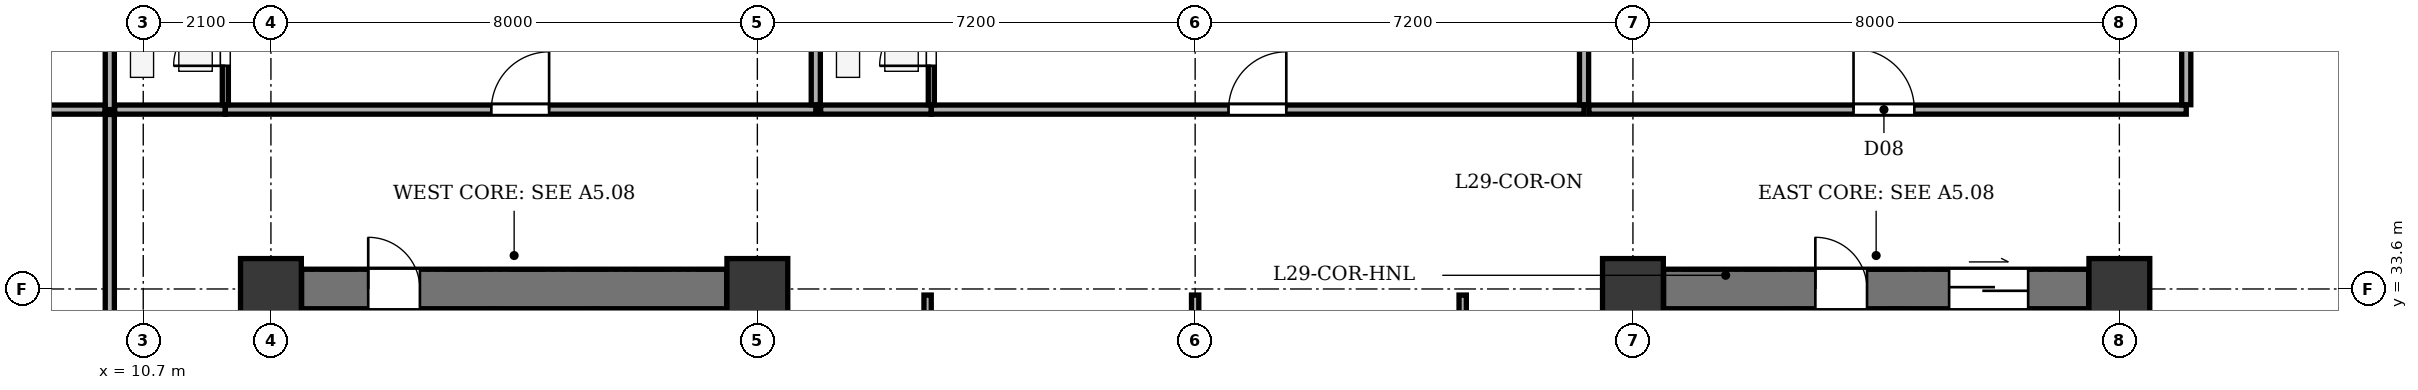
"""IFC4 building model, lengths in metres.
Left out: names, types, materials, properties, quantities, classifications, styles, units other than length and angle.
Written with IfcOpenShell. Run it as: python <this file> out.ifc"""

import sys

from ifc_helpers import new_model, si_unit, direction, frame, frame_2d, origin, origin_2d, place, context, subcontext, project, spatial, rectangle, extrude, element, fill, save


model = new_model("IFC4")
c1 = context("Model", 3, precision=1e-05, world=origin(), true_north=direction((0.0, 1.0)))
c2 = subcontext(c1, "Body", "Model", "MODEL_VIEW")
j1 = project(units=[si_unit("LENGTHUNIT", "METRE"), si_unit("PLANEANGLEUNIT", "RADIAN")], contexts=[c1])
p1 = place(None, origin())
s1 = spatial("IfcSite", under=j1, at=p1, CompositionType="ELEMENT")
p2 = place(p1, origin())
s2 = spatial("IfcBuilding", under=s1, at=p2, CompositionType="ELEMENT")
p3 = place(p2, frame((0.0, 0.0, 120.3)))
s3 = spatial("IfcBuildingStorey", under=s2, at=p3, CompositionType="ELEMENT", Elevation=120.3)
for number, where, z_axis, x_axis in (
    (1, (12.8, 33.6, 0.0), (0.0, 0.0, 1.0), (1.0, 0.0, 0.0)),
    (2, (20.8, 33.6, 0.0), (0.0, 0.0, 1.0), (1.0, 0.0, 0.0)),
    (3, (35.2, 33.6, 0.0), (0.0, 0.0, 1.0), (1.0, 0.0, 0.0)),
    (4, (43.2, 33.6, 0.0), (0.0, 0.0, 1.0), (1.0, 0.0, 0.0)),
):
    element("IfcColumn", number, at=place(p3, frame(where, z_axis=z_axis, x_axis=x_axis)), inside=s3, PredefinedType="COLUMN", context=c2, shape_type="SweptSolid", body=[
        extrude(rectangle(XDim=1.0, YDim=1.0, at=origin_2d()), origin(), (0.0, 0.0, 1.0), 3.5),
    ])
p4 = place(p3, frame((13.305, 33.6, 0.0), z_axis=(0.0, 0.0, 1.0), x_axis=(1.0, 0.0, 0.0)))
e5 = element("IfcWall", 5, at=p4, inside=s3, PredefinedType="SHEAR", context=c2, shape_type="SweptSolid", body=[
    extrude(rectangle(XDim=6.99, YDim=0.65, at=frame_2d((3.495, 0.0))), origin(), (0.0, 0.0, 1.0), 3.2),
])
p5 = place(p4, frame((1.095, 0.0, 0.0)))
e6 = element("IfcOpeningElement", 6, at=p5, cuts=e5, PredefinedType="OPENING", context=c2, shape_type="SweptSolid", body=[
    extrude(rectangle(XDim=0.85, YDim=2.02, at=frame_2d((0.425, 1.01))), frame((0.0, 0.335, 0.0), z_axis=(0.0, -1.0, 0.0), x_axis=(1.0, 0.0, 0.0)), (0.0, 0.0, 1.0), 0.67),
])
p6 = place(p3, frame((16.435, 21.135, 0.0), z_axis=(0.0, 0.0, 1.0), x_axis=(0.0, 1.0, 0.0)))
e7 = element("IfcWall", 7, at=p6, inside=s3, PredefinedType="SHEAR", context=c2, shape_type="SweptSolid", body=[
    extrude(rectangle(XDim=12.13, YDim=0.25, at=frame_2d((6.065, 0.0))), origin(), (0.0, 0.0, 1.0), 3.2),
])
p7 = place(p6, frame((0.515, 0.0, 0.0)))
e8 = element("IfcOpeningElement", 8, at=p7, cuts=e7, PredefinedType="OPENING", context=c2, shape_type="SweptSolid", body=[
    extrude(rectangle(XDim=1.2, YDim=2.15, at=frame_2d((0.6, 1.075))), frame((0.0, 0.135, 0.0), z_axis=(0.0, -1.0, 0.0), x_axis=(1.0, 0.0, 0.0)), (0.0, 0.0, 1.0), 0.27),
])
p8 = place(p6, frame((2.665, 0.0, 0.0)))
e9 = element("IfcOpeningElement", 9, at=p8, cuts=e7, PredefinedType="OPENING", context=c2, shape_type="SweptSolid", body=[
    extrude(rectangle(XDim=1.15, YDim=2.15, at=frame_2d((0.575, 1.075))), frame((0.0, 0.135, 0.0), z_axis=(0.0, -1.0, 0.0), x_axis=(1.0, 0.0, 0.0)), (0.0, 0.0, 1.0), 0.27),
])
p9 = place(p3, frame((18.12, 31.17, 0.0), z_axis=(0.0, 0.0, 1.0), x_axis=(0.0, 1.0, 0.0)))
e10 = element("IfcWall", 10, at=p9, inside=s3, PredefinedType="PARTITIONING", context=c2, shape_type="SweptSolid", body=[
    extrude(rectangle(XDim=2.095, YDim=0.18, at=frame_2d((1.047, 0.0))), origin(), (0.0, 0.0, 1.0), 3.2),
])
p10 = place(p3, frame((35.705, 33.6, 0.0), z_axis=(0.0, 0.0, 1.0), x_axis=(1.0, 0.0, 0.0)))
e11 = element("IfcWall", 11, at=p10, inside=s3, PredefinedType="SHEAR", context=c2, shape_type="SweptSolid", body=[
    extrude(rectangle(XDim=6.99, YDim=0.65, at=frame_2d((3.495, 0.0))), origin(), (0.0, 0.0, 1.0), 3.2),
])
p11 = place(p10, frame((4.695, 0.0, 0.0)))
e12 = element("IfcOpeningElement", 12, at=p11, cuts=e11, PredefinedType="OPENING", context=c2, shape_type="SweptSolid", body=[
    extrude(rectangle(XDim=1.3, YDim=2.15, at=frame_2d((0.65, 1.075))), frame((0.0, 0.335, 0.0), z_axis=(0.0, -1.0, 0.0), x_axis=(1.0, 0.0, 0.0)), (0.0, 0.0, 1.0), 0.67),
])
p12 = place(p10, frame((2.495, 0.0, 0.0)))
e13 = element("IfcOpeningElement", 13, at=p12, cuts=e11, PredefinedType="OPENING", context=c2, shape_type="SweptSolid", body=[
    extrude(rectangle(XDim=0.85, YDim=2.02, at=frame_2d((0.425, 1.01))), frame((0.0, 0.335, 0.0), z_axis=(0.0, -1.0, 0.0), x_axis=(1.0, 0.0, 0.0)), (0.0, 0.0, 1.0), 0.67),
])
p13 = place(p3, frame((39.565, 21.135, 0.0), z_axis=(0.0, 0.0, 1.0), x_axis=(0.0, 1.0, 0.0)))
e14 = element("IfcWall", 14, at=p13, inside=s3, PredefinedType="SHEAR", context=c2, shape_type="SweptSolid", body=[
    extrude(rectangle(XDim=12.13, YDim=0.25, at=frame_2d((6.065, 0.0))), origin(), (0.0, 0.0, 1.0), 3.2),
])
p14 = place(p13, frame((0.515, 0.0, 0.0)))
e15 = element("IfcOpeningElement", 15, at=p14, cuts=e14, PredefinedType="OPENING", context=c2, shape_type="SweptSolid", body=[
    extrude(rectangle(XDim=1.2, YDim=2.15, at=frame_2d((0.6, 1.075))), frame((0.0, 0.135, 0.0), z_axis=(0.0, -1.0, 0.0), x_axis=(1.0, 0.0, 0.0)), (0.0, 0.0, 1.0), 0.27),
])
p15 = place(p13, frame((2.665, 0.0, 0.0)))
e16 = element("IfcOpeningElement", 16, at=p15, cuts=e14, PredefinedType="OPENING", context=c2, shape_type="SweptSolid", body=[
    extrude(rectangle(XDim=1.15, YDim=2.15, at=frame_2d((0.575, 1.075))), frame((0.0, 0.135, 0.0), z_axis=(0.0, -1.0, 0.0), x_axis=(1.0, 0.0, 0.0)), (0.0, 0.0, 1.0), 0.27),
])
p16 = place(p3, frame((37.9, 25.27, 0.0), z_axis=(0.0, 0.0, 1.0), x_axis=(0.0, 1.0, 0.0)))
e17 = element("IfcWall", 17, at=p16, inside=s3, PredefinedType="SOLIDWALL", context=c2, shape_type="SweptSolid", body=[
    extrude(rectangle(XDim=7.995, YDim=0.2, at=frame_2d((3.998, 0.0))), origin(), (0.0, 0.0, 1.0), 3.2),
])
for number, where, z_axis, x_axis in (
    (18, (23.6, 25.315, 0.0), (0.0, 0.0, 1.0), (0.0, 1.0, 0.0)),
    (19, (32.4, 25.315, 0.0), (0.0, 0.0, 1.0), (0.0, 1.0, 0.0)),
):
    element("IfcWall", number, at=place(p3, frame(where, z_axis=z_axis, x_axis=x_axis)), inside=s3, PredefinedType="PARTITIONING", context=c2, shape_type="SweptSolid", body=[
        extrude(rectangle(XDim=8.185, YDim=0.12, at=frame_2d((4.093, 0.0))), origin(), (0.0, 0.0, 1.0), 3.2),
    ])
p17 = place(p3, frame((28.0, 25.315, 0.0), z_axis=(0.0, 0.0, 1.0), x_axis=(0.0, 1.0, 0.0)))
e20 = element("IfcWall", 20, at=p17, inside=s3, PredefinedType="PARTITIONING", context=c2, shape_type="SweptSolid", body=[
    extrude(rectangle(XDim=8.185, YDim=0.12, at=frame_2d((4.093, 0.0))), origin(), (0.0, 0.0, 1.0), 2.535),
])
p18 = place(p3, frame((10.15, 36.55, 0.0), z_axis=(0.0, 0.0, 1.0), x_axis=(0.0, 1.0, 0.0)))
e21 = element("IfcWall", 21, at=p18, inside=s3, PredefinedType="PARTITIONING", context=c2, shape_type="SweptSolid", body=[
    extrude(rectangle(XDim=9.575, YDim=0.15, at=frame_2d((4.788, 0.0))), origin(), (0.0, 0.0, 1.0), 3.2),
])
p19 = place(p3, frame((10.23, 36.55, 0.0), z_axis=(0.0, 0.0, 1.0), x_axis=(1.0, 0.0, 0.0)))
e22 = element("IfcWall", 22, at=p19, inside=s3, PredefinedType="PARTITIONING", context=c2, shape_type="SweptSolid", body=[
    extrude(rectangle(XDim=1.82, YDim=0.15, at=frame_2d((0.91, 0.0))), origin(), (0.0, 0.0, 1.0), 3.2),
])
p20 = place(p3, frame((12.05, 36.55, 0.0), z_axis=(0.0, 0.0, 1.0), x_axis=(1.0, 0.0, 0.0)))
e23 = element("IfcWall", 23, at=p20, inside=s3, PredefinedType="PARTITIONING", context=c2, shape_type="SweptSolid", body=[
    extrude(rectangle(XDim=9.711, YDim=0.15, at=frame_2d((4.855, 0.0))), origin(), (0.0, 0.0, 1.0), 3.2),
])
p21 = place(p20, frame((4.375, 0.0, 0.0)))
e24 = element("IfcOpeningElement", 24, at=p21, cuts=e23, PredefinedType="OPENING", context=c2, shape_type="SweptSolid", body=[
    extrude(rectangle(XDim=0.95, YDim=2.1, at=frame_2d((0.475, 1.05))), frame((0.0, 0.085, 0.0), z_axis=(0.0, -1.0, 0.0), x_axis=(1.0, 0.0, 0.0)), (0.0, 0.0, 1.0), 0.17),
])
p22 = place(p3, frame((12.05, 36.63, 0.0), z_axis=(0.0, 0.0, 1.0), x_axis=(0.0, 1.0, 0.0)))
e25 = element("IfcWall", 25, at=p22, inside=s3, PredefinedType="PARTITIONING", context=c2, shape_type="SweptSolid", body=[
    extrude(rectangle(XDim=2.25, YDim=0.1, at=frame_2d((1.125, 0.0))), origin(), (0.0, 0.0, 1.0), 3.2),
])
p23 = place(p22, frame((0.64, 0.0, 0.0)))
e26 = element("IfcOpeningElement", 26, at=p23, cuts=e25, PredefinedType="OPENING", context=c2, shape_type="SweptSolid", body=[
    extrude(rectangle(XDim=0.85, YDim=2.05, at=frame_2d((0.425, 1.025))), frame((0.0, 0.06, 0.0), z_axis=(0.0, -1.0, 0.0), x_axis=(1.0, 0.0, 0.0)), (0.0, 0.0, 1.0), 0.12),
])
p24 = place(p3, frame((21.761, 36.63, 0.0), z_axis=(0.0, 0.0, 1.0), x_axis=(0.0, 1.0, 0.0)))
e27 = element("IfcWall", 27, at=p24, inside=s3, PredefinedType="PARTITIONING", context=c2, shape_type="SweptSolid", body=[
    extrude(rectangle(XDim=9.495, YDim=0.15, at=frame_2d((4.748, 0.0))), origin(), (0.0, 0.0, 1.0), 3.2),
])
p25 = place(p3, frame((21.841, 36.55, 0.0), z_axis=(0.0, 0.0, 1.0), x_axis=(1.0, 0.0, 0.0)))
e28 = element("IfcWall", 28, at=p25, inside=s3, PredefinedType="PARTITIONING", context=c2, shape_type="SweptSolid", body=[
    extrude(rectangle(XDim=1.82, YDim=0.15, at=frame_2d((0.91, 0.0))), origin(), (0.0, 0.0, 1.0), 3.2),
])
p26 = place(p3, frame((23.661, 36.55, 0.0), z_axis=(0.0, 0.0, 1.0), x_axis=(1.0, 0.0, 0.0)))
e29 = element("IfcWall", 29, at=p26, inside=s3, PredefinedType="PARTITIONING", context=c2, shape_type="SweptSolid", body=[
    extrude(rectangle(XDim=10.735, YDim=0.15, at=frame_2d((5.368, 0.0))), origin(), (0.0, 0.0, 1.0), 3.2),
])
p27 = place(p26, frame((4.888, 0.0, 0.0)))
e30 = element("IfcOpeningElement", 30, at=p27, cuts=e29, PredefinedType="OPENING", context=c2, shape_type="SweptSolid", body=[
    extrude(rectangle(XDim=0.95, YDim=2.1, at=frame_2d((0.475, 1.05))), frame((0.0, 0.085, 0.0), z_axis=(0.0, -1.0, 0.0), x_axis=(1.0, 0.0, 0.0)), (0.0, 0.0, 1.0), 0.17),
])
p28 = place(p3, frame((23.661, 36.63, 0.0), z_axis=(0.0, 0.0, 1.0), x_axis=(0.0, 1.0, 0.0)))
e31 = element("IfcWall", 31, at=p28, inside=s3, PredefinedType="PARTITIONING", context=c2, shape_type="SweptSolid", body=[
    extrude(rectangle(XDim=2.25, YDim=0.1, at=frame_2d((1.125, 0.0))), origin(), (0.0, 0.0, 1.0), 3.2),
])
p29 = place(p28, frame((0.64, 0.0, 0.0)))
e32 = element("IfcOpeningElement", 32, at=p29, cuts=e31, PredefinedType="OPENING", context=c2, shape_type="SweptSolid", body=[
    extrude(rectangle(XDim=0.85, YDim=2.05, at=frame_2d((0.425, 1.025))), frame((0.0, 0.06, 0.0), z_axis=(0.0, -1.0, 0.0), x_axis=(1.0, 0.0, 0.0)), (0.0, 0.0, 1.0), 0.12),
])
p30 = place(p3, frame((34.396, 36.63, 0.0), z_axis=(0.0, 0.0, 1.0), x_axis=(0.0, 1.0, 0.0)))
e33 = element("IfcWall", 33, at=p30, inside=s3, PredefinedType="PARTITIONING", context=c2, shape_type="SweptSolid", body=[
    extrude(rectangle(XDim=9.495, YDim=0.15, at=frame_2d((4.748, 0.0))), origin(), (0.0, 0.0, 1.0), 3.2),
])
p31 = place(p3, frame((34.476, 36.55, 0.0), z_axis=(0.0, 0.0, 1.0), x_axis=(1.0, 0.0, 0.0)))
e34 = element("IfcWall", 34, at=p31, inside=s3, PredefinedType="PARTITIONING", context=c2, shape_type="SweptSolid", body=[
    extrude(rectangle(XDim=9.824, YDim=0.15, at=frame_2d((4.912, 0.0))), origin(), (0.0, 0.0, 1.0), 3.2),
])
p32 = place(p31, frame((4.352, 0.0, 0.0)))
e35 = element("IfcOpeningElement", 35, at=p32, cuts=e34, PredefinedType="OPENING", context=c2, shape_type="SweptSolid", body=[
    extrude(rectangle(XDim=1.0, YDim=2.1, at=frame_2d((0.5, 1.05))), frame((0.0, 0.085, 0.0), z_axis=(0.0, -1.0, 0.0), x_axis=(1.0, 0.0, 0.0)), (0.0, 0.0, 1.0), 0.17),
])
p33 = place(p3, frame((44.3, 36.63, 0.0), z_axis=(0.0, 0.0, 1.0), x_axis=(0.0, 1.0, 0.0)))
e36 = element("IfcWall", 36, at=p33, inside=s3, PredefinedType="PARTITIONING", context=c2, shape_type="SweptSolid", body=[
    extrude(rectangle(XDim=9.495, YDim=0.15, at=frame_2d((4.748, 0.0))), origin(), (0.0, 0.0, 1.0), 3.2),
])
p34 = place(p3, frame((4.675, 36.55, 0.0), z_axis=(0.0, 0.0, 1.0), x_axis=(1.0, 0.0, 0.0)))
e37 = element("IfcWall", 37, at=p34, inside=s3, PredefinedType="PARTITIONING", context=c2, shape_type="SweptSolid", body=[
    extrude(rectangle(XDim=5.395, YDim=0.15, at=frame_2d((2.698, 0.0))), origin(), (0.0, 0.0, 1.0), 3.2),
])
p35 = place(p3, frame((10.15, 17.93, 0.0), z_axis=(0.0, 0.0, 1.0), x_axis=(0.0, 1.0, 0.0)))
e38 = element("IfcWall", 38, at=p35, inside=s3, PredefinedType="PARTITIONING", context=c2, shape_type="SweptSolid", body=[
    extrude(rectangle(XDim=18.54, YDim=0.15, at=frame_2d((9.27, 0.0))), origin(), (0.0, 0.0, 1.0), 3.2),
])
p36 = place(p35, frame((8.79, 0.0, 0.0)))
e39 = element("IfcOpeningElement", 39, at=p36, cuts=e38, PredefinedType="OPENING", context=c2, shape_type="SweptSolid", body=[
    extrude(rectangle(XDim=0.95, YDim=2.1, at=frame_2d((0.475, 1.05))), frame((0.0, 0.085, 0.0), z_axis=(0.0, -1.0, 0.0), x_axis=(1.0, 0.0, 0.0)), (0.0, 0.0, 1.0), 0.17),
])
p37 = place(p5, origin())
e40 = element("IfcDoor", 40, at=p37, inside=s3, OperationType="SINGLE_SWING_LEFT", PredefinedType="DOOR", context=c2, shape_type="SweptSolid", body=[
    extrude(rectangle(XDim=0.85, YDim=2.02, at=frame_2d((0.425, 1.01))), frame((0.0, 0.025, 0.0), z_axis=(0.0, -1.0, 0.0), x_axis=(1.0, 0.0, 0.0)), (0.0, 0.0, 1.0), 0.05),
])
fill(e6, e40)
p38 = place(p11, origin())
e41 = element("IfcDoor", 41, at=p38, inside=s3, OperationType="DOUBLE_DOOR_SLIDING", PredefinedType="DOOR", context=c2, shape_type="SweptSolid", body=[
    extrude(rectangle(XDim=1.3, YDim=2.15, at=frame_2d((0.65, 1.075))), frame((0.0, 0.025, 0.0), z_axis=(0.0, -1.0, 0.0), x_axis=(1.0, 0.0, 0.0)), (0.0, 0.0, 1.0), 0.05),
])
fill(e12, e41)
p39 = place(p12, origin())
e42 = element("IfcDoor", 42, at=p39, inside=s3, OperationType="SINGLE_SWING_LEFT", PredefinedType="DOOR", context=c2, shape_type="SweptSolid", body=[
    extrude(rectangle(XDim=0.85, YDim=2.02, at=frame_2d((0.425, 1.01))), frame((0.0, 0.025, 0.0), z_axis=(0.0, -1.0, 0.0), x_axis=(1.0, 0.0, 0.0)), (0.0, 0.0, 1.0), 0.05),
])
fill(e13, e42)
p40 = place(p23, origin())
e43 = element("IfcDoor", 43, at=p40, inside=s3, OperationType="SINGLE_SWING_LEFT", PredefinedType="DOOR", context=c2, shape_type="SweptSolid", body=[
    extrude(rectangle(XDim=0.85, YDim=2.05, at=frame_2d((0.425, 1.025))), frame((0.0, 0.025, 0.0), z_axis=(0.0, -1.0, 0.0), x_axis=(1.0, 0.0, 0.0)), (0.0, 0.0, 1.0), 0.05),
])
fill(e26, e43)
p41 = place(p21, origin())
e44 = element("IfcDoor", 44, at=p41, inside=s3, OperationType="SINGLE_SWING_RIGHT", PredefinedType="DOOR", context=c2, shape_type="SweptSolid", body=[
    extrude(rectangle(XDim=0.95, YDim=2.1, at=frame_2d((0.475, 1.05))), frame((0.0, 0.025, 0.0), z_axis=(0.0, -1.0, 0.0), x_axis=(1.0, 0.0, 0.0)), (0.0, 0.0, 1.0), 0.05),
])
fill(e24, e44)
p42 = place(p29, origin())
e45 = element("IfcDoor", 45, at=p42, inside=s3, OperationType="SINGLE_SWING_LEFT", PredefinedType="DOOR", context=c2, shape_type="SweptSolid", body=[
    extrude(rectangle(XDim=0.85, YDim=2.05, at=frame_2d((0.425, 1.025))), frame((0.0, 0.025, 0.0), z_axis=(0.0, -1.0, 0.0), x_axis=(1.0, 0.0, 0.0)), (0.0, 0.0, 1.0), 0.05),
])
fill(e32, e45)
p43 = place(p27, origin())
e46 = element("IfcDoor", 46, at=p43, inside=s3, OperationType="SINGLE_SWING_RIGHT", PredefinedType="DOOR", context=c2, shape_type="SweptSolid", body=[
    extrude(rectangle(XDim=0.95, YDim=2.1, at=frame_2d((0.475, 1.05))), frame((0.0, 0.025, 0.0), z_axis=(0.0, -1.0, 0.0), x_axis=(1.0, 0.0, 0.0)), (0.0, 0.0, 1.0), 0.05),
])
fill(e30, e46)
p44 = place(p32, origin())
e47 = element("IfcDoor", 47, at=p44, inside=s3, OperationType="SINGLE_SWING_LEFT", PredefinedType="DOOR", context=c2, shape_type="SweptSolid", body=[
    extrude(rectangle(XDim=1.0, YDim=2.1, at=frame_2d((0.5, 1.05))), frame((0.0, 0.025, 0.0), z_axis=(0.0, -1.0, 0.0), x_axis=(1.0, 0.0, 0.0)), (0.0, 0.0, 1.0), 0.05),
])
fill(e35, e47)
save(model, sys.argv[1])
